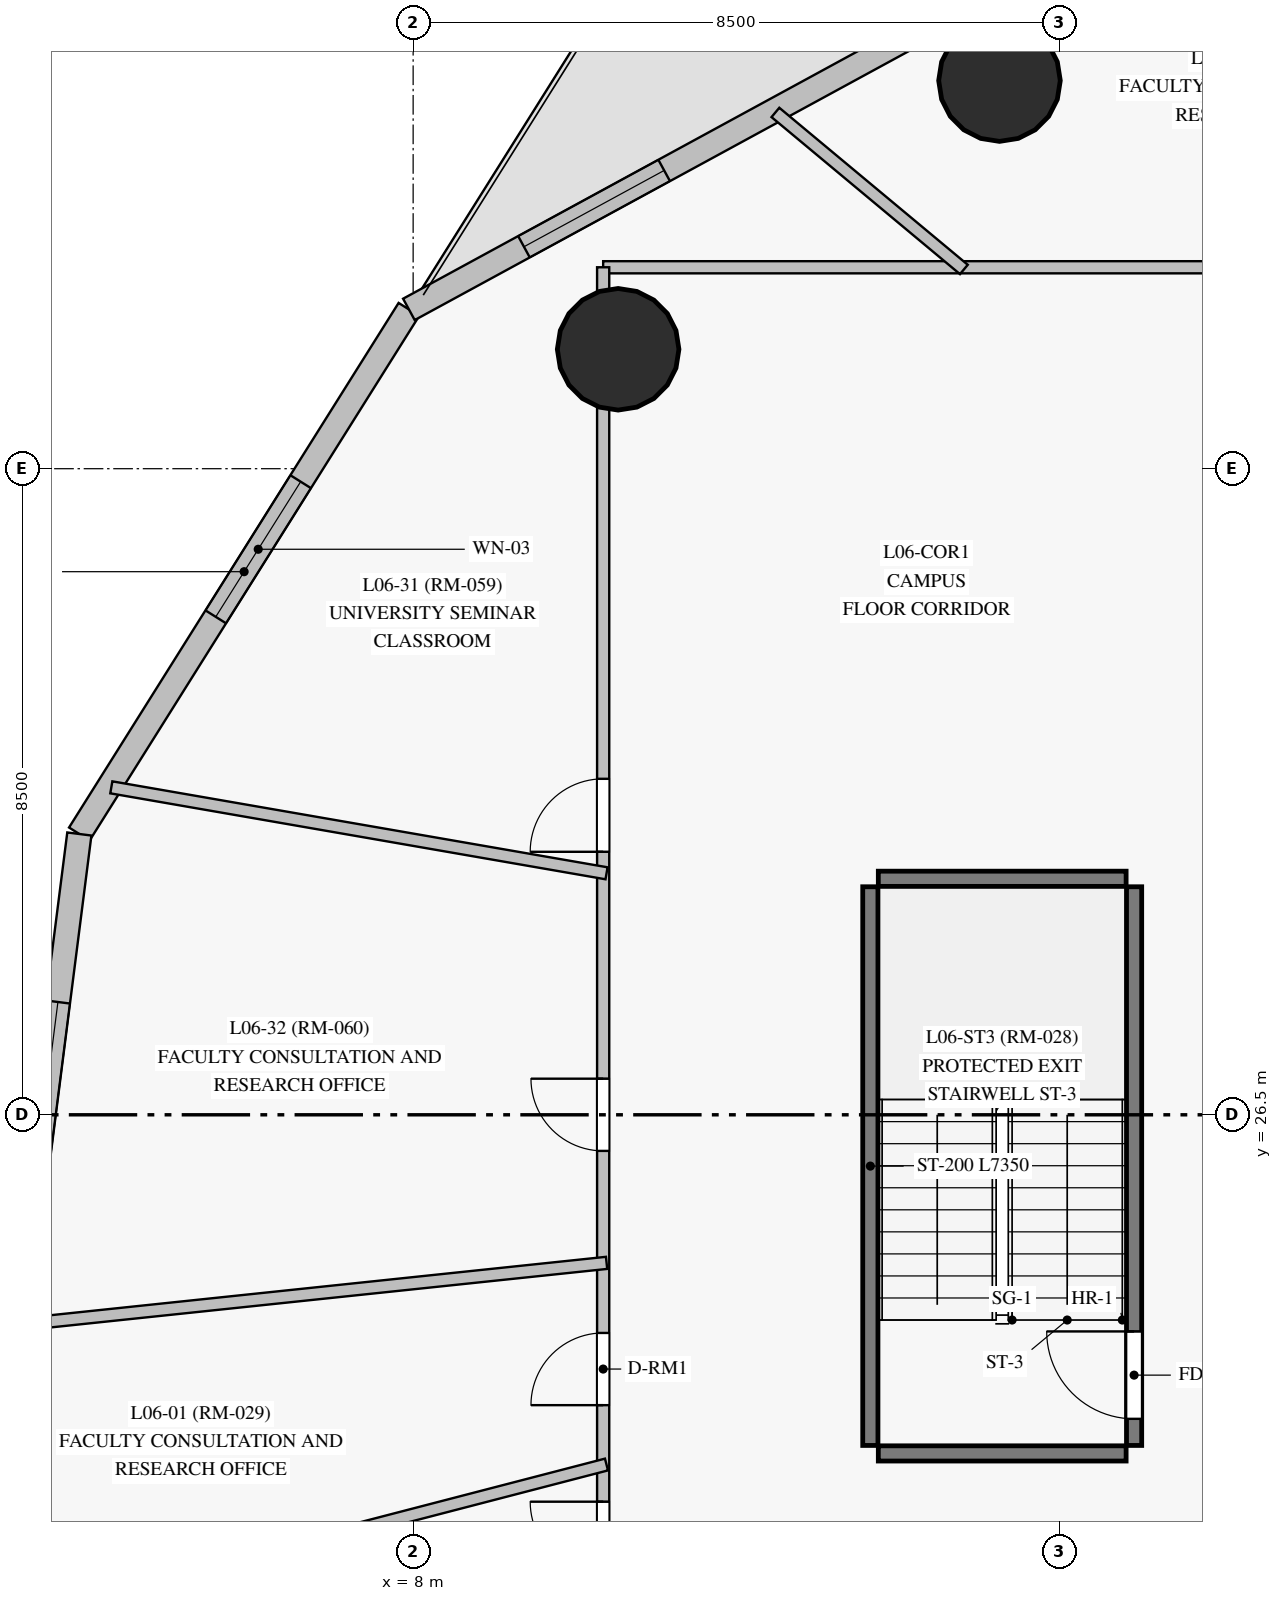
"""IFC4 building model, lengths in metres.
Left out: names, types, materials, properties, quantities, classifications, styles, units other than length and angle.
Written with IfcOpenShell. Run it as: python <this file> out.ifc"""

import sys

from ifc_helpers import new_model, si_unit, direction, frame, frame_2d, origin, origin_with_axes, origin_2d, place, context, subcontext, project, spatial, rectangle, circle, extrude, source, transform, mapped, element, fill, save


model = new_model("IFC4")
c1 = context("Model", 3, precision=1e-05, world=origin(), true_north=direction((0.0, 1.0)))
c2 = subcontext(c1, "Body", "Model", "MODEL_VIEW")
j1 = project(units=[si_unit("LENGTHUNIT", "METRE"), si_unit("PLANEANGLEUNIT", "RADIAN")], contexts=[c1])
p1 = place(None, origin())
s1 = spatial("IfcSite", under=j1, at=p1, CompositionType="ELEMENT")
p2 = place(p1, origin())
s2 = spatial("IfcBuilding", under=s1, at=p2, CompositionType="ELEMENT")
p3 = place(p2, frame((0.0, 0.0, 26.5)))
s3 = spatial("IfcBuildingStorey", under=s2, at=p3, CompositionType="ELEMENT", Elevation=26.5)
m1 = source(origin_with_axes(), c2, "Body", "SweptSolid", [
    extrude(circle(Radius=0.8, at=origin_2d()), origin(), (0.0, 0.0, 1.0), 3.6),
])
for number, where, z_axis, x_axis in (
    (1, (15.714, 40.106, 0.0), (0.0, 0.0, 1.0), (1.0, 0.0, 0.0)),
    (2, (10.697, 36.571, 0.0), (0.0, 0.0, 1.0), (1.0, 0.0, 0.0)),
):
    element("IfcColumn", number, at=place(p3, frame(where, z_axis=z_axis, x_axis=x_axis)), inside=s3, PredefinedType="COLUMN", context=c2, shape_type="MappedRepresentation", body=[
        mapped(m1, transform((0.0, 0.0, 0.0), scale=1.0)),
    ])
p4 = place(p3, frame((7.944, 37.096, 0.0), z_axis=(0.0, 0.0, 1.0), x_axis=(-0.531962963156, -0.846767622096, 0.0)))
e3 = element("IfcWall", 3, at=p4, inside=s3, PredefinedType="SOLIDWALL", context=c2, shape_type="SweptSolid", body=[
    extrude(rectangle(XDim=8.151, YDim=0.32, at=frame_2d((4.075, 0.0))), origin(), (0.0, 0.0, 1.0), 3.35),
])
p5 = place(p4, frame((2.677, 0.0, 0.85)))
e4 = element("IfcOpeningElement", 4, at=p5, cuts=e3, PredefinedType="OPENING", context=c2, shape_type="SweptSolid", body=[
    extrude(rectangle(XDim=2.1, YDim=1.95, at=frame_2d((1.05, 0.975))), frame((0.0, 0.17, 0.0), z_axis=(0.0, -1.0, 0.0), x_axis=(1.0, 0.0, 0.0)), (0.0, 0.0, 1.0), 0.34),
])
p6 = place(p3, frame((3.608, 30.194, 0.0), z_axis=(0.0, 0.0, 1.0), x_axis=(-0.126495776424, -0.991967145901, 0.0)))
e5 = element("IfcWall", 5, at=p6, inside=s3, PredefinedType="SOLIDWALL", context=c2, shape_type="SweptSolid", body=[
    extrude(rectangle(XDim=10.853, YDim=0.32, at=frame_2d((5.426, 0.0))), origin(), (0.0, 0.0, 1.0), 3.35),
])
p7 = place(p6, frame((2.228, 0.0, 0.85)))
e6 = element("IfcOpeningElement", 6, at=p7, cuts=e5, PredefinedType="OPENING", context=c2, shape_type="SweptSolid", body=[
    extrude(rectangle(XDim=2.1, YDim=1.95, at=frame_2d((1.05, 0.975))), frame((0.0, 0.17, 0.0), z_axis=(0.0, -1.0, 0.0), x_axis=(1.0, 0.0, 0.0)), (0.0, 0.0, 1.0), 0.34),
])
p8 = place(p6, frame((7.449, 0.0, 0.85)))
e7 = element("IfcOpeningElement", 7, at=p8, cuts=e5, PredefinedType="OPENING", context=c2, shape_type="SweptSolid", body=[
    extrude(rectangle(XDim=2.1, YDim=1.95, at=frame_2d((1.05, 0.975))), frame((0.0, 0.17, 0.0), z_axis=(0.0, -1.0, 0.0), x_axis=(1.0, 0.0, 0.0)), (0.0, 0.0, 1.0), 0.34),
])
p9 = place(p3, frame((30.761, 49.515, 0.0), z_axis=(0.0, 0.0, 1.0), x_axis=(-0.878317970129, -0.478076922, 0.0)))
e8 = element("IfcWall", 8, at=p9, inside=s3, PredefinedType="SOLIDWALL", context=c2, shape_type="SweptSolid", body=[
    extrude(rectangle(XDim=25.977, YDim=0.32, at=frame_2d((12.989, 0.0))), origin(), (0.0, 0.0, 1.0), 3.35),
])
p10 = place(p9, frame((2.309, 0.0, 0.85)))
e9 = element("IfcOpeningElement", 9, at=p10, cuts=e8, PredefinedType="OPENING", context=c2, shape_type="SweptSolid", body=[
    extrude(rectangle(XDim=2.1, YDim=1.95, at=frame_2d((1.05, 0.975))), frame((0.0, 0.17, 0.0), z_axis=(0.0, -1.0, 0.0), x_axis=(1.0, 0.0, 0.0)), (0.0, 0.0, 1.0), 0.34),
])
p11 = place(p9, frame((6.998, 0.0, 0.85)))
e10 = element("IfcOpeningElement", 10, at=p11, cuts=e8, PredefinedType="OPENING", context=c2, shape_type="SweptSolid", body=[
    extrude(rectangle(XDim=2.1, YDim=1.95, at=frame_2d((1.05, 0.975))), frame((0.0, 0.17, 0.0), z_axis=(0.0, -1.0, 0.0), x_axis=(1.0, 0.0, 0.0)), (0.0, 0.0, 1.0), 0.34),
])
p12 = place(p9, frame((22.154, 0.0, 0.85)))
e11 = element("IfcOpeningElement", 11, at=p12, cuts=e8, PredefinedType="OPENING", context=c2, shape_type="SweptSolid", body=[
    extrude(rectangle(XDim=2.1, YDim=1.95, at=frame_2d((1.05, 0.975))), frame((0.0, 0.17, 0.0), z_axis=(0.0, -1.0, 0.0), x_axis=(1.0, 0.0, 0.0)), (0.0, 0.0, 1.0), 0.34),
])
p13 = place(p9, frame((12.464, 0.0, 0.0)))
e12 = element("IfcOpeningElement", 12, at=p13, cuts=e8, PredefinedType="OPENING", context=c2, shape_type="SweptSolid", body=[
    extrude(rectangle(XDim=1.05, YDim=2.12, at=frame_2d((0.525, 1.06))), frame((0.0, 0.17, 0.0), z_axis=(0.0, -1.0, 0.0), x_axis=(1.0, 0.0, 0.0)), (0.0, 0.0, 1.0), 0.34),
])
p14 = place(p3, frame((14.015, 22.15, 0.0), z_axis=(0.0, 0.0, 1.0), x_axis=(0.0, 1.0, 0.0)))
e13 = element("IfcWall", 13, at=p14, inside=s3, PredefinedType="SHEAR", context=c2, shape_type="SweptSolid", body=[
    extrude(rectangle(XDim=7.35, YDim=0.2, at=frame_2d((3.675, 0.0))), origin(), (0.0, 0.0, 1.0), 3.35),
])
p15 = place(p3, frame((17.485, 22.15, 0.0), z_axis=(0.0, 0.0, 1.0), x_axis=(0.0, 1.0, 0.0)))
e14 = element("IfcWall", 14, at=p15, inside=s3, PredefinedType="SHEAR", context=c2, shape_type="SweptSolid", body=[
    extrude(rectangle(XDim=7.35, YDim=0.2, at=frame_2d((3.675, 0.0))), origin(), (0.0, 0.0, 1.0), 3.35),
])
p16 = place(p15, frame((0.35, 0.0, 0.0)))
e15 = element("IfcOpeningElement", 15, at=p16, cuts=e14, PredefinedType="OPENING", context=c2, shape_type="SweptSolid", body=[
    extrude(rectangle(XDim=1.15, YDim=2.15, at=frame_2d((0.575, 1.075))), frame((0.0, 0.11, 0.0), z_axis=(0.0, -1.0, 0.0), x_axis=(1.0, 0.0, 0.0)), (0.0, 0.0, 1.0), 0.22),
])
for number, where, z_axis, x_axis in (
    (16, (14.12, 22.045, 0.0), (0.0, 0.0, 1.0), (1.0, 0.0, 0.0)),
    (17, (14.12, 29.605, 0.0), (0.0, 0.0, 1.0), (1.0, 0.0, 0.0)),
):
    element("IfcWall", number, at=place(p3, frame(where, z_axis=z_axis, x_axis=x_axis)), inside=s3, PredefinedType="SHEAR", context=c2, shape_type="SweptSolid", body=[
        extrude(rectangle(XDim=3.26, YDim=0.2, at=frame_2d((1.63, 0.0))), origin(), (0.0, 0.0, 1.0), 3.35),
    ])
p17 = place(p3, frame((10.5, 37.65, 0.0), z_axis=(0.0, 0.0, 1.0), x_axis=(1.0, 0.0, 0.0)))
e18 = element("IfcWall", 18, at=p17, inside=s3, PredefinedType="PARTITIONING", context=c2, shape_type="SweptSolid", body=[
    extrude(rectangle(XDim=29.75, YDim=0.16, at=frame_2d((14.875, 0.0))), origin(), (0.0, 0.0, 1.0), 2.75),
])
p18 = place(p17, frame((26.906, 0.0, 0.0)))
e19 = element("IfcOpeningElement", 19, at=p18, cuts=e18, PredefinedType="OPENING", context=c2, shape_type="SweptSolid", body=[
    extrude(rectangle(XDim=0.95, YDim=2.15, at=frame_2d((0.475, 1.075))), frame((0.0, 0.09, 0.0), z_axis=(0.0, -1.0, 0.0), x_axis=(1.0, 0.0, 0.0)), (0.0, 0.0, 1.0), 0.18),
])
p19 = place(p17, frame((24.377, 0.0, 0.0)))
e20 = element("IfcOpeningElement", 20, at=p19, cuts=e18, PredefinedType="OPENING", context=c2, shape_type="SweptSolid", body=[
    extrude(rectangle(XDim=0.95, YDim=2.15, at=frame_2d((0.475, 1.075))), frame((0.0, 0.09, 0.0), z_axis=(0.0, -1.0, 0.0), x_axis=(1.0, 0.0, 0.0)), (0.0, 0.0, 1.0), 0.18),
])
p20 = place(p17, frame((21.812, 0.0, 0.0)))
e21 = element("IfcOpeningElement", 21, at=p20, cuts=e18, PredefinedType="OPENING", context=c2, shape_type="SweptSolid", body=[
    extrude(rectangle(XDim=0.96, YDim=2.15, at=frame_2d((0.48, 1.075))), frame((0.0, 0.09, 0.0), z_axis=(0.0, -1.0, 0.0), x_axis=(1.0, 0.0, 0.0)), (0.0, 0.0, 1.0), 0.18),
])
p21 = place(p17, frame((19.548, 0.0, 0.0)))
e22 = element("IfcOpeningElement", 22, at=p21, cuts=e18, PredefinedType="OPENING", context=c2, shape_type="SweptSolid", body=[
    extrude(rectangle(XDim=0.95, YDim=2.15, at=frame_2d((0.475, 1.075))), frame((0.0, 0.09, 0.0), z_axis=(0.0, -1.0, 0.0), x_axis=(1.0, 0.0, 0.0)), (0.0, 0.0, 1.0), 0.18),
])
p22 = place(p17, frame((17.272, 0.0, 0.0)))
e23 = element("IfcOpeningElement", 23, at=p22, cuts=e18, PredefinedType="OPENING", context=c2, shape_type="SweptSolid", body=[
    extrude(rectangle(XDim=0.95, YDim=2.15, at=frame_2d((0.475, 1.075))), frame((0.0, 0.09, 0.0), z_axis=(0.0, -1.0, 0.0), x_axis=(1.0, 0.0, 0.0)), (0.0, 0.0, 1.0), 0.18),
])
p23 = place(p17, frame((15.625, 0.0, 0.0)))
e24 = element("IfcOpeningElement", 24, at=p23, cuts=e18, PredefinedType="OPENING", context=c2, shape_type="SweptSolid", body=[
    extrude(rectangle(XDim=0.96, YDim=2.15, at=frame_2d((0.48, 1.075))), frame((0.0, 0.09, 0.0), z_axis=(0.0, -1.0, 0.0), x_axis=(1.0, 0.0, 0.0)), (0.0, 0.0, 1.0), 0.18),
])
p24 = place(p17, frame((14.4, 0.0, 0.0)))
e25 = element("IfcOpeningElement", 25, at=p24, cuts=e18, PredefinedType="OPENING", context=c2, shape_type="SweptSolid", body=[
    extrude(rectangle(XDim=0.95, YDim=2.15, at=frame_2d((0.475, 1.075))), frame((0.0, 0.09, 0.0), z_axis=(0.0, -1.0, 0.0), x_axis=(1.0, 0.0, 0.0)), (0.0, 0.0, 1.0), 0.18),
])
p25 = place(p17, frame((9.938, 0.0, 0.0)))
e26 = element("IfcOpeningElement", 26, at=p25, cuts=e18, PredefinedType="OPENING", context=c2, shape_type="SweptSolid", body=[
    extrude(rectangle(XDim=0.95, YDim=2.15, at=frame_2d((0.475, 1.075))), frame((0.0, 0.09, 0.0), z_axis=(0.0, -1.0, 0.0), x_axis=(1.0, 0.0, 0.0)), (0.0, 0.0, 1.0), 0.18),
])
p26 = place(p3, frame((10.5, 15.35, 0.0), z_axis=(0.0, 0.0, 1.0), x_axis=(0.0, 1.0, 0.0)))
e27 = element("IfcWall", 27, at=p26, inside=s3, PredefinedType="PARTITIONING", context=c2, shape_type="SweptSolid", body=[
    extrude(rectangle(XDim=22.3, YDim=0.16, at=frame_2d((11.15, 0.0))), origin(), (0.0, 0.0, 1.0), 2.75),
])
p27 = place(p26, frame((7.33, 0.0, 0.0)))
e28 = element("IfcOpeningElement", 28, at=p27, cuts=e27, PredefinedType="OPENING", context=c2, shape_type="SweptSolid", body=[
    extrude(rectangle(XDim=0.95, YDim=2.15, at=frame_2d((0.475, 1.075))), frame((0.0, 0.09, 0.0), z_axis=(0.0, -1.0, 0.0), x_axis=(1.0, 0.0, 0.0)), (0.0, 0.0, 1.0), 0.18),
])
p28 = place(p26, frame((5.1, 0.0, 0.0)))
e29 = element("IfcOpeningElement", 29, at=p28, cuts=e27, PredefinedType="OPENING", context=c2, shape_type="SweptSolid", body=[
    extrude(rectangle(XDim=0.96, YDim=2.15, at=frame_2d((0.48, 1.075))), frame((0.0, 0.09, 0.0), z_axis=(0.0, -1.0, 0.0), x_axis=(1.0, 0.0, 0.0)), (0.0, 0.0, 1.0), 0.18),
])
p29 = place(p26, frame((14.61, 0.0, 0.0)))
e30 = element("IfcOpeningElement", 30, at=p29, cuts=e27, PredefinedType="OPENING", context=c2, shape_type="SweptSolid", body=[
    extrude(rectangle(XDim=0.96, YDim=2.15, at=frame_2d((0.48, 1.075))), frame((0.0, 0.09, 0.0), z_axis=(0.0, -1.0, 0.0), x_axis=(1.0, 0.0, 0.0)), (0.0, 0.0, 1.0), 0.18),
])
p30 = place(p26, frame((10.675, 0.0, 0.0)))
e31 = element("IfcOpeningElement", 31, at=p30, cuts=e27, PredefinedType="OPENING", context=c2, shape_type="SweptSolid", body=[
    extrude(rectangle(XDim=0.95, YDim=2.15, at=frame_2d((0.475, 1.075))), frame((0.0, 0.09, 0.0), z_axis=(0.0, -1.0, 0.0), x_axis=(1.0, 0.0, 0.0)), (0.0, 0.0, 1.0), 0.18),
])
p31 = place(p3, frame((10.543, 21.899, 0.0), z_axis=(0.0, 0.0, 1.0), x_axis=(-0.96789820828, -0.25134251214, 0.0)))
e32 = element("IfcWall", 32, at=p31, inside=s3, PredefinedType="PARTITIONING", context=c2, shape_type="SweptSolid", body=[
    extrude(rectangle(XDim=8.509, YDim=0.16, at=frame_2d((4.254, 0.0))), origin(), (0.0, 0.0, 1.0), 3.35),
])
p32 = place(p3, frame((2.812, 23.739, 0.0), z_axis=(0.0, 0.0, 1.0), x_axis=(0.994515255514, 0.104591617975, 0.0)))
e33 = element("IfcWall", 33, at=p32, inside=s3, PredefinedType="PARTITIONING", context=c2, shape_type="SweptSolid", body=[
    extrude(rectangle(XDim=7.775, YDim=0.16, at=frame_2d((3.888, 0.0))), origin(), (0.0, 0.0, 1.0), 3.35),
])
p33 = place(p3, frame((10.544, 29.677, 0.0), z_axis=(0.0, 0.0, 1.0), x_axis=(-0.985268064988, 0.171017075509, 0.0)))
e34 = element("IfcWall", 34, at=p33, inside=s3, PredefinedType="PARTITIONING", context=c2, shape_type="SweptSolid", body=[
    extrude(rectangle(XDim=6.613, YDim=0.16, at=frame_2d((3.306, 0.0))), origin(), (0.0, 0.0, 1.0), 3.35),
])
p34 = place(p3, frame((15.246, 37.621, 0.0), z_axis=(0.0, 0.0, 1.0), x_axis=(-0.768270881878, 0.640124872238, 0.0)))
e35 = element("IfcWall", 35, at=p34, inside=s3, PredefinedType="PARTITIONING", context=c2, shape_type="SweptSolid", body=[
    extrude(rectangle(XDim=3.227, YDim=0.16, at=frame_2d((1.614, 0.0))), origin(), (0.0, 0.0, 1.0), 3.35),
])
m2 = source(origin_with_axes(), c2, "Body", "SweptSolid", [
    extrude(rectangle(XDim=2.1, YDim=1.95, at=frame_2d((1.05, 0.975))), frame((0.0, 0.03, 0.0), z_axis=(0.0, -1.0, 0.0), x_axis=(1.0, 0.0, 0.0)), (0.0, 0.0, 1.0), 0.06),
])
p35 = place(p5, origin())
e36 = element("IfcWindow", 36, at=p35, inside=s3, PartitioningType="SINGLE_PANEL", PredefinedType="WINDOW", context=c2, shape_type="MappedRepresentation", body=[
    mapped(m2, transform((0.0, 0.0, 0.0), scale=1.0)),
])
fill(e4, e36)
p36 = place(p7, origin())
e37 = element("IfcWindow", 37, at=p36, inside=s3, PartitioningType="SINGLE_PANEL", PredefinedType="WINDOW", context=c2, shape_type="MappedRepresentation", body=[
    mapped(m2, transform((0.0, 0.0, 0.0), scale=1.0)),
])
fill(e6, e37)
p37 = place(p12, origin())
e38 = element("IfcWindow", 38, at=p37, inside=s3, PartitioningType="SINGLE_PANEL", PredefinedType="WINDOW", context=c2, shape_type="MappedRepresentation", body=[
    mapped(m2, transform((0.0, 0.0, 0.0), scale=1.0)),
])
fill(e11, e38)
m3 = source(origin_with_axes(), c2, "Body", "SweptSolid", [
    extrude(rectangle(XDim=1.15, YDim=2.15, at=frame_2d((0.575, 1.075))), frame((0.0, 0.025, 0.0), z_axis=(0.0, -1.0, 0.0), x_axis=(1.0, 0.0, 0.0)), (0.0, 0.0, 1.0), 0.05),
])
p38 = place(p16, origin())
e39 = element("IfcDoor", 39, at=p38, inside=s3, OperationType="SINGLE_SWING_RIGHT", PredefinedType="DOOR", context=c2, shape_type="MappedRepresentation", body=[
    mapped(m3, transform((0.0, 0.0, 0.0), scale=1.0)),
])
fill(e15, e39)
m4 = source(origin_with_axes(), c2, "Body", "SweptSolid", [
    extrude(rectangle(XDim=0.95, YDim=2.15, at=frame_2d((0.475, 1.075))), frame((0.0, 0.025, 0.0), z_axis=(0.0, -1.0, 0.0), x_axis=(1.0, 0.0, 0.0)), (0.0, 0.0, 1.0), 0.05),
])
p39 = place(p27, origin())
e40 = element("IfcDoor", 40, at=p39, inside=s3, OperationType="SINGLE_SWING_LEFT", PredefinedType="DOOR", context=c2, shape_type="MappedRepresentation", body=[
    mapped(m4, transform((0.0, 0.0, 0.0), scale=1.0)),
])
fill(e28, e40)
m5 = source(origin_with_axes(), c2, "Body", "SweptSolid", [
    extrude(rectangle(XDim=0.96, YDim=2.15, at=frame_2d((0.48, 1.075))), frame((0.0, 0.025, 0.0), z_axis=(0.0, -1.0, 0.0), x_axis=(1.0, 0.0, 0.0)), (0.0, 0.0, 1.0), 0.05),
])
p40 = place(p28, origin())
e41 = element("IfcDoor", 41, at=p40, inside=s3, OperationType="SINGLE_SWING_RIGHT", PredefinedType="DOOR", context=c2, shape_type="MappedRepresentation", body=[
    mapped(m5, transform((0.0, 0.0, 0.0), scale=1.0)),
])
fill(e29, e41)
p41 = place(p29, origin())
e42 = element("IfcDoor", 42, at=p41, inside=s3, OperationType="SINGLE_SWING_LEFT", PredefinedType="DOOR", context=c2, shape_type="MappedRepresentation", body=[
    mapped(m5, transform((0.0, 0.0, 0.0), scale=1.0)),
])
fill(e30, e42)
p42 = place(p30, origin())
e43 = element("IfcDoor", 43, at=p42, inside=s3, OperationType="SINGLE_SWING_RIGHT", PredefinedType="DOOR", context=c2, shape_type="MappedRepresentation", body=[
    mapped(m4, transform((0.0, 0.0, 0.0), scale=1.0)),
])
fill(e31, e43)
save(model, sys.argv[1])
